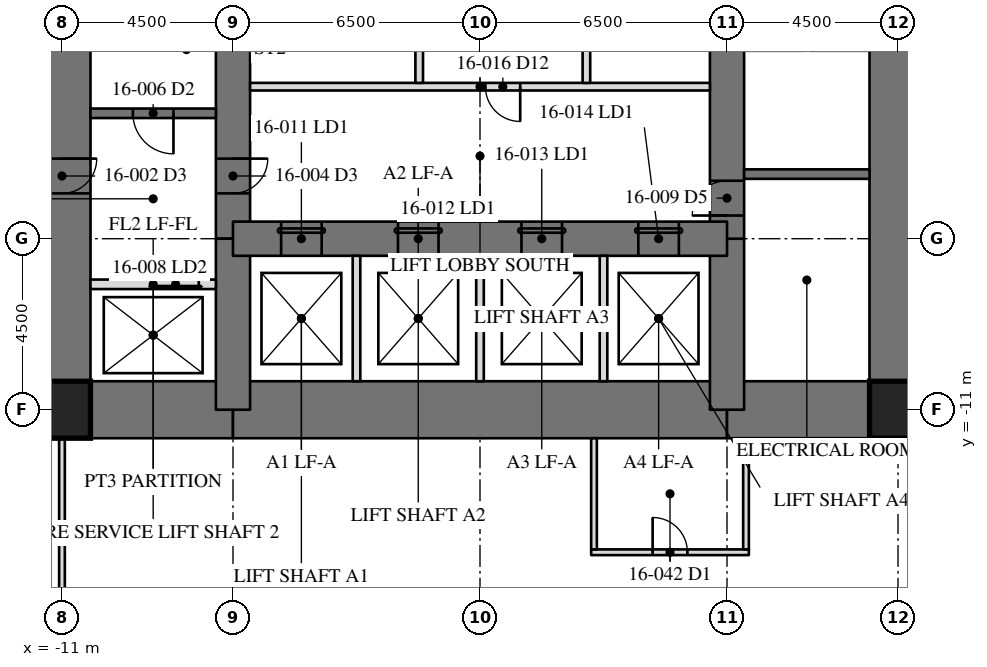
"""IFC4 building model, lengths in metres.
Left out: names, types, materials, properties, quantities, classifications, styles, units other than length and angle.
Written with IfcOpenShell. Run it as: python <this file> out.ifc"""

import sys

from ifc_helpers import new_model, si_unit, direction, frame, frame_2d, origin, origin_2d, place, context, subcontext, project, spatial, rectangle, hollow_rectangle, extrude, element, fill, save


model = new_model("IFC4")
c1 = context("Model", 3, precision=1e-05, world=origin(), true_north=direction((0.0, 1.0)))
c2 = subcontext(c1, "Body", "Model", "MODEL_VIEW")
j1 = project(units=[si_unit("LENGTHUNIT", "METRE"), si_unit("PLANEANGLEUNIT", "RADIAN")], contexts=[c1])
p1 = place(None, origin())
s1 = spatial("IfcSite", under=j1, at=p1, CompositionType="ELEMENT")
p2 = place(p1, origin())
s2 = spatial("IfcBuilding", under=s1, at=p2, CompositionType="ELEMENT")
p3 = place(p2, frame((0.0, 0.0, 69.3)))
s3 = spatial("IfcBuildingStorey", under=s2, at=p3, CompositionType="ELEMENT", Elevation=69.3)
p4 = place(p3, frame((11.0, -11.0, 0.0), z_axis=(0.0, 0.0, 1.0), x_axis=(0.0, 1.0, 0.0)))
e1 = element("IfcWall", 1, at=p4, inside=s3, PredefinedType="SHEAR", context=c2, shape_type="SweptSolid", body=[
    extrude(rectangle(XDim=22.0, YDim=1.5, at=frame_2d((11.0, 0.0))), origin(), (0.0, 0.0, 1.0), 4.1),
])
p5 = place(p4, frame((15.393, 0.0, 0.0)))
e2 = element("IfcOpeningElement", 2, at=p5, cuts=e1, PredefinedType="OPENING", context=c2, shape_type="SweptSolid", body=[
    extrude(rectangle(XDim=0.915, YDim=2.134, at=frame_2d((0.458, 1.067))), frame((0.0, 0.76, 0.0), z_axis=(0.0, -1.0, 0.0), x_axis=(1.0, 0.0, 0.0)), (0.0, 0.0, 1.0), 1.52),
])
p6 = place(p3, frame((-11.0, 11.0, 0.0), z_axis=(0.0, 0.0, 1.0), x_axis=(0.0, -1.0, 0.0)))
e3 = element("IfcWall", 3, at=p6, inside=s3, PredefinedType="SHEAR", context=c2, shape_type="SweptSolid", body=[
    extrude(rectangle(XDim=22.0, YDim=1.5, at=frame_2d((11.0, 0.0))), origin(), (0.0, 0.0, 1.0), 4.1),
])
p7 = place(p6, frame((15.393, 0.0, 0.0)))
e4 = element("IfcOpeningElement", 4, at=p7, cuts=e3, PredefinedType="OPENING", context=c2, shape_type="SweptSolid", body=[
    extrude(rectangle(XDim=0.915, YDim=2.134, at=frame_2d((0.458, 1.067))), frame((0.0, 0.76, 0.0), z_axis=(0.0, -1.0, 0.0), x_axis=(1.0, 0.0, 0.0)), (0.0, 0.0, 1.0), 1.52),
])
p8 = place(p3, frame((-11.0, -11.0, 0.0), z_axis=(0.0, 0.0, 1.0), x_axis=(1.0, 0.0, 0.0)))
e5 = element("IfcWall", 5, at=p8, inside=s3, PredefinedType="SHEAR", context=c2, shape_type="SweptSolid", body=[
    extrude(rectangle(XDim=4.5, YDim=1.5, at=frame_2d((2.25, 0.0))), origin(), (0.0, 0.0, 1.0), 4.1),
])
p9 = place(p3, frame((-6.5, -11.0, 0.0), z_axis=(0.0, 0.0, 1.0), x_axis=(1.0, 0.0, 0.0)))
e6 = element("IfcWall", 6, at=p9, inside=s3, PredefinedType="SHEAR", context=c2, shape_type="SweptSolid", body=[
    extrude(rectangle(XDim=13.0, YDim=1.5, at=frame_2d((6.5, 0.0))), origin(), (0.0, 0.0, 1.0), 4.1),
])
p10 = place(p3, frame((6.5, -11.0, 0.0), z_axis=(0.0, 0.0, 1.0), x_axis=(1.0, 0.0, 0.0)))
e7 = element("IfcWall", 7, at=p10, inside=s3, PredefinedType="SHEAR", context=c2, shape_type="SweptSolid", body=[
    extrude(rectangle(XDim=4.5, YDim=1.5, at=frame_2d((2.25, 0.0))), origin(), (0.0, 0.0, 1.0), 4.1),
])
p11 = place(p3, frame((6.5, -11.0, 0.0), z_axis=(0.0, 0.0, 1.0), x_axis=(0.0, 1.0, 0.0)))
e8 = element("IfcWall", 8, at=p11, inside=s3, PredefinedType="SHEAR", context=c2, shape_type="SweptSolid", body=[
    extrude(rectangle(XDim=4.5, YDim=0.9, at=frame_2d((2.25, 0.0))), origin(), (0.0, 0.0, 1.0), 4.1),
])
p12 = place(p3, frame((6.5, -6.5, 0.0), z_axis=(0.0, 0.0, 1.0), x_axis=(0.0, 1.0, 0.0)))
e9 = element("IfcWall", 9, at=p12, inside=s3, PredefinedType="SHEAR", context=c2, shape_type="SweptSolid", body=[
    extrude(rectangle(XDim=13.0, YDim=0.9, at=frame_2d((6.5, 0.0))), origin(), (0.0, 0.0, 1.0), 4.1),
])
p13 = place(p12, frame((10.893, 0.0, 0.0)))
e10 = element("IfcOpeningElement", 10, at=p13, cuts=e9, PredefinedType="OPENING", context=c2, shape_type="SweptSolid", body=[
    extrude(rectangle(XDim=0.915, YDim=2.134, at=frame_2d((0.458, 1.067))), frame((0.0, 0.46, 0.0), z_axis=(0.0, -1.0, 0.0), x_axis=(1.0, 0.0, 0.0)), (0.0, 0.0, 1.0), 0.92),
])
p14 = place(p12, frame((0.61, 0.0, 0.0)))
e11 = element("IfcOpeningElement", 11, at=p14, cuts=e9, PredefinedType="OPENING", context=c2, shape_type="SweptSolid", body=[
    extrude(rectangle(XDim=0.915, YDim=2.134, at=frame_2d((0.458, 1.067))), frame((0.0, 0.46, 0.0), z_axis=(0.0, -1.0, 0.0), x_axis=(1.0, 0.0, 0.0)), (0.0, 0.0, 1.0), 0.92),
])
p15 = place(p3, frame((-6.5, 6.5, 0.0), z_axis=(0.0, 0.0, 1.0), x_axis=(0.0, -1.0, 0.0)))
e12 = element("IfcWall", 12, at=p15, inside=s3, PredefinedType="SHEAR", context=c2, shape_type="SweptSolid", body=[
    extrude(rectangle(XDim=13.0, YDim=0.9, at=frame_2d((6.5, 0.0))), origin(), (0.0, 0.0, 1.0), 4.1),
])
p16 = place(p15, frame((10.893, 0.0, 0.0)))
e13 = element("IfcOpeningElement", 13, at=p16, cuts=e12, PredefinedType="OPENING", context=c2, shape_type="SweptSolid", body=[
    extrude(rectangle(XDim=0.915, YDim=2.134, at=frame_2d((0.458, 1.067))), frame((0.0, 0.46, 0.0), z_axis=(0.0, -1.0, 0.0), x_axis=(1.0, 0.0, 0.0)), (0.0, 0.0, 1.0), 0.92),
])
p17 = place(p15, frame((0.61, 0.0, 0.0)))
e14 = element("IfcOpeningElement", 14, at=p17, cuts=e12, PredefinedType="OPENING", context=c2, shape_type="SweptSolid", body=[
    extrude(rectangle(XDim=0.915, YDim=2.134, at=frame_2d((0.458, 1.067))), frame((0.0, 0.46, 0.0), z_axis=(0.0, -1.0, 0.0), x_axis=(1.0, 0.0, 0.0)), (0.0, 0.0, 1.0), 0.92),
])
p18 = place(p3, frame((-6.5, -6.5, 0.0), z_axis=(0.0, 0.0, 1.0), x_axis=(0.0, -1.0, 0.0)))
e15 = element("IfcWall", 15, at=p18, inside=s3, PredefinedType="SHEAR", context=c2, shape_type="SweptSolid", body=[
    extrude(rectangle(XDim=4.5, YDim=0.9, at=frame_2d((2.25, 0.0))), origin(), (0.0, 0.0, 1.0), 4.1),
])
p19 = place(p3, frame((-6.5, -6.5, 0.0), z_axis=(0.0, 0.0, 1.0), x_axis=(1.0, 0.0, 0.0)))
e16 = element("IfcWall", 16, at=p19, inside=s3, PredefinedType="SHEAR", context=c2, shape_type="SweptSolid", body=[
    extrude(rectangle(XDim=13.0, YDim=0.9, at=frame_2d((6.5, 0.0))), origin(), (0.0, 0.0, 1.0), 4.1),
])
p20 = place(p19, frame((1.267, 0.0, 0.0)))
e17 = element("IfcOpeningElement", 17, at=p20, cuts=e16, PredefinedType="OPENING", context=c2, shape_type="SweptSolid", body=[
    extrude(rectangle(XDim=1.067, YDim=2.134, at=frame_2d((0.533, 1.067))), frame((0.0, 0.46, 0.0), z_axis=(0.0, -1.0, 0.0), x_axis=(1.0, 0.0, 0.0)), (0.0, 0.0, 1.0), 0.92),
])
p21 = place(p19, frame((4.342, 0.0, 0.0)))
e18 = element("IfcOpeningElement", 18, at=p21, cuts=e16, PredefinedType="OPENING", context=c2, shape_type="SweptSolid", body=[
    extrude(rectangle(XDim=1.067, YDim=2.134, at=frame_2d((0.533, 1.067))), frame((0.0, 0.46, 0.0), z_axis=(0.0, -1.0, 0.0), x_axis=(1.0, 0.0, 0.0)), (0.0, 0.0, 1.0), 0.92),
])
p22 = place(p19, frame((7.592, 0.0, 0.0)))
e19 = element("IfcOpeningElement", 19, at=p22, cuts=e16, PredefinedType="OPENING", context=c2, shape_type="SweptSolid", body=[
    extrude(rectangle(XDim=1.067, YDim=2.134, at=frame_2d((0.533, 1.067))), frame((0.0, 0.46, 0.0), z_axis=(0.0, -1.0, 0.0), x_axis=(1.0, 0.0, 0.0)), (0.0, 0.0, 1.0), 0.92),
])
p23 = place(p19, frame((10.667, 0.0, 0.0)))
e20 = element("IfcOpeningElement", 20, at=p23, cuts=e16, PredefinedType="OPENING", context=c2, shape_type="SweptSolid", body=[
    extrude(rectangle(XDim=1.067, YDim=2.134, at=frame_2d((0.533, 1.067))), frame((0.0, 0.46, 0.0), z_axis=(0.0, -1.0, 0.0), x_axis=(1.0, 0.0, 0.0)), (0.0, 0.0, 1.0), 0.92),
])
for number, where, z_axis, x_axis in (
    (21, (-11.0, -11.0, 0.0), (0.0, 0.0, 1.0), (1.0, 0.0, 0.0)),
    (22, (11.0, -11.0, 0.0), (0.0, 0.0, 1.0), (1.0, 0.0, 0.0)),
):
    element("IfcColumn", number, at=place(p3, frame(where, z_axis=z_axis, x_axis=x_axis)), inside=s3, PredefinedType="COLUMN", context=c2, shape_type="SweptSolid", body=[
        extrude(hollow_rectangle(XDim=1.499, YDim=1.499, WallThickness=0.102, at=origin_2d()), origin(), (0.0, 0.0, 1.0), 4.1),
    ])
p24 = place(p3, frame((6.95, -4.8, 0.0), z_axis=(0.0, 0.0, 1.0), x_axis=(1.0, 0.0, 0.0)))
e23 = element("IfcWall", 23, at=p24, inside=s3, PredefinedType="SOLIDWALL", context=c2, shape_type="SweptSolid", body=[
    extrude(rectangle(XDim=3.3, YDim=0.25, at=frame_2d((1.65, 0.0))), origin(), (0.0, 0.0, 1.0), 3.91),
])
p25 = place(p3, frame((-6.95, -3.2, 0.0), z_axis=(0.0, 0.0, 1.0), x_axis=(-1.0, 0.0, 0.0)))
e24 = element("IfcWall", 24, at=p25, inside=s3, PredefinedType="SOLIDWALL", context=c2, shape_type="SweptSolid", body=[
    extrude(rectangle(XDim=3.3, YDim=0.25, at=frame_2d((1.65, 0.0))), origin(), (0.0, 0.0, 1.0), 3.91),
])
p26 = place(p25, frame((1.116, 0.0, 0.0)))
e25 = element("IfcOpeningElement", 25, at=p26, cuts=e24, PredefinedType="OPENING", context=c2, shape_type="SweptSolid", body=[
    extrude(rectangle(XDim=1.067, YDim=2.134, at=frame_2d((0.533, 1.067))), frame((0.0, 0.135, 0.0), z_axis=(0.0, -1.0, 0.0), x_axis=(1.0, 0.0, 0.0)), (0.0, 0.0, 1.0), 0.27),
])
p27 = place(p3, frame((-6.95, -7.7, 0.0), z_axis=(0.0, 0.0, 1.0), x_axis=(-1.0, 0.0, 0.0)))
e26 = element("IfcWall", 26, at=p27, inside=s3, PredefinedType="PARTITIONING", context=c2, shape_type="SweptSolid", body=[
    extrude(rectangle(XDim=3.3, YDim=0.25, at=frame_2d((1.65, 0.0))), origin(), (0.0, 0.0, 1.0), 3.91),
])
p28 = place(p27, frame((0.45, 0.0, 0.0)))
e27 = element("IfcOpeningElement", 27, at=p28, cuts=e26, PredefinedType="OPENING", context=c2, shape_type="SweptSolid", body=[
    extrude(rectangle(XDim=1.219, YDim=2.134, at=frame_2d((0.609, 1.067))), frame((0.0, 0.135, 0.0), z_axis=(0.0, -1.0, 0.0), x_axis=(1.0, 0.0, 0.0)), (0.0, 0.0, 1.0), 0.27),
])
p29 = place(p3, frame((6.05, -2.5, 0.0), z_axis=(0.0, 0.0, 1.0), x_axis=(-1.0, 0.0, 0.0)))
e28 = element("IfcWall", 28, at=p29, inside=s3, PredefinedType="PARTITIONING", context=c2, shape_type="SweptSolid", body=[
    extrude(rectangle(XDim=12.1, YDim=0.2, at=frame_2d((6.05, 0.0))), origin(), (0.0, 0.0, 1.0), 3.91),
])
p30 = place(p29, frame((4.992, 0.0, 0.0)))
e29 = element("IfcOpeningElement", 29, at=p30, cuts=e28, PredefinedType="OPENING", context=c2, shape_type="SweptSolid", body=[
    extrude(rectangle(XDim=0.915, YDim=2.134, at=frame_2d((0.458, 1.067))), frame((0.0, 0.11, 0.0), z_axis=(0.0, -1.0, 0.0), x_axis=(1.0, 0.0, 0.0)), (0.0, 0.0, 1.0), 0.22),
])
for number, where, z_axis, x_axis in (
    (30, (-3.25, -10.25, 0.0), (0.0, 0.0, 1.0), (0.0, 1.0, 0.0)),
    (31, (0.0, -10.25, 0.0), (0.0, 0.0, 1.0), (0.0, 1.0, 0.0)),
    (32, (3.25, -10.25, 0.0), (0.0, 0.0, 1.0), (0.0, 1.0, 0.0)),
):
    element("IfcWall", number, at=place(p3, frame(where, z_axis=z_axis, x_axis=x_axis)), inside=s3, PredefinedType="PARTITIONING", context=c2, shape_type="SweptSolid", body=[
        extrude(rectangle(XDim=3.3, YDim=0.2, at=frame_2d((1.65, 0.0))), origin(), (0.0, 0.0, 1.0), 3.91),
    ])
for number, where, z_axis, x_axis in (
    (33, (-1.6, -2.4, 0.0), (0.0, 0.0, 1.0), (0.0, 1.0, 0.0)),
    (34, (2.8, -2.4, 0.0), (0.0, 0.0, 1.0), (0.0, 1.0, 0.0)),
):
    element("IfcWall", number, at=place(p3, frame(where, z_axis=z_axis, x_axis=x_axis)), inside=s3, PredefinedType="PARTITIONING", context=c2, shape_type="SweptSolid", body=[
        extrude(rectangle(XDim=4.8, YDim=0.2, at=frame_2d((2.4, 0.0))), origin(), (0.0, 0.0, 1.0), 3.91),
    ])
p31 = place(p3, frame((-11.0, -11.75, 0.0), z_axis=(0.0, 0.0, 1.0), x_axis=(0.0, -1.0, 0.0)))
e35 = element("IfcWall", 35, at=p31, inside=s3, PredefinedType="PARTITIONING", context=c2, shape_type="SweptSolid", body=[
    extrude(rectangle(XDim=13.665, YDim=0.15, at=frame_2d((6.833, 0.0))), origin(), (0.0, 0.0, 1.0), 3.13),
])
p32 = place(p31, frame((6.018, 0.0, 0.0)))
e36 = element("IfcOpeningElement", 36, at=p32, cuts=e35, PredefinedType="OPENING", context=c2, shape_type="SweptSolid", body=[
    extrude(rectangle(XDim=0.915, YDim=2.134, at=frame_2d((0.458, 1.067))), frame((0.0, 0.085, 0.0), z_axis=(0.0, -1.0, 0.0), x_axis=(1.0, 0.0, 0.0)), (0.0, 0.0, 1.0), 0.17),
])
p33 = place(p3, frame((2.925, -14.75, 0.0), z_axis=(0.0, 0.0, 1.0), x_axis=(1.0, 0.0, 0.0)))
e37 = element("IfcWall", 37, at=p33, inside=s3, PredefinedType="PARTITIONING", context=c2, shape_type="SweptSolid", body=[
    extrude(rectangle(XDim=4.15, YDim=0.15, at=frame_2d((2.075, 0.0))), origin(), (0.0, 0.0, 1.0), 3.91),
])
p34 = place(p33, frame((1.617, 0.0, 0.0)))
e38 = element("IfcOpeningElement", 38, at=p34, cuts=e37, PredefinedType="OPENING", context=c2, shape_type="SweptSolid", body=[
    extrude(rectangle(XDim=0.915, YDim=2.134, at=frame_2d((0.458, 1.067))), frame((0.0, 0.085, 0.0), z_axis=(0.0, -1.0, 0.0), x_axis=(1.0, 0.0, 0.0)), (0.0, 0.0, 1.0), 0.17),
])
for number, where, z_axis, x_axis in (
    (39, (3.0, -14.675, 0.0), (0.0, 0.0, 1.0), (0.0, 1.0, 0.0)),
    (40, (7.0, -14.675, 0.0), (0.0, 0.0, 1.0), (0.0, 1.0, 0.0)),
):
    element("IfcWall", number, at=place(p3, frame(where, z_axis=z_axis, x_axis=x_axis)), inside=s3, PredefinedType="PARTITIONING", context=c2, shape_type="SweptSolid", body=[
        extrude(rectangle(XDim=2.925, YDim=0.15, at=frame_2d((1.462, 0.0))), origin(), (0.0, 0.0, 1.0), 3.91),
    ])
p35 = place(p16, origin())
e41 = element("IfcDoor", 41, at=p35, inside=s3, OperationType="SINGLE_SWING_RIGHT", PredefinedType="DOOR", context=c2, shape_type="SweptSolid", body=[
    extrude(rectangle(XDim=0.915, YDim=2.134, at=frame_2d((0.458, 1.067))), frame((0.0, -0.375, 0.0), z_axis=(0.0, -1.0, 0.0), x_axis=(1.0, 0.0, 0.0)), (0.0, 0.0, 1.0), 0.05),
])
fill(e13, e41)
p36 = place(p26, origin())
e42 = element("IfcDoor", 42, at=p36, inside=s3, OperationType="SINGLE_SWING_LEFT", PredefinedType="DOOR", context=c2, shape_type="SweptSolid", body=[
    extrude(rectangle(XDim=1.067, YDim=2.134, at=frame_2d((0.533, 1.067))), frame((0.0, 0.025, 0.0), z_axis=(0.0, -1.0, 0.0), x_axis=(1.0, 0.0, 0.0)), (0.0, 0.0, 1.0), 0.05),
])
fill(e25, e42)
p37 = place(p28, origin())
e43 = element("IfcDoor", 43, at=p37, inside=s3, OperationType="SLIDING_TO_LEFT", PredefinedType="DOOR", context=c2, shape_type="SweptSolid", body=[
    extrude(rectangle(XDim=1.219, YDim=2.134, at=frame_2d((0.609, 1.067))), frame((0.0, 0.025, 0.0), z_axis=(0.0, -1.0, 0.0), x_axis=(1.0, 0.0, 0.0)), (0.0, 0.0, 1.0), 0.05),
])
fill(e27, e43)
p38 = place(p14, origin())
e44 = element("IfcDoor", 44, at=p38, inside=s3, OperationType="SINGLE_SWING_RIGHT", PredefinedType="DOOR", context=c2, shape_type="SweptSolid", body=[
    extrude(rectangle(XDim=0.915, YDim=2.134, at=frame_2d((0.458, 1.067))), frame((0.0, -0.375, 0.0), z_axis=(0.0, -1.0, 0.0), x_axis=(1.0, 0.0, 0.0)), (0.0, 0.0, 1.0), 0.05),
])
fill(e11, e44)
p39 = place(p20, origin())
e45 = element("IfcDoor", 45, at=p39, inside=s3, OperationType="SLIDING_TO_LEFT", PredefinedType="DOOR", context=c2, shape_type="SweptSolid", body=[
    extrude(rectangle(XDim=1.067, YDim=2.134, at=frame_2d((0.533, 1.067))), frame((0.0, -0.375, 0.0), z_axis=(0.0, -1.0, 0.0), x_axis=(1.0, 0.0, 0.0)), (0.0, 0.0, 1.0), 0.05),
])
fill(e17, e45)
p40 = place(p21, origin())
e46 = element("IfcDoor", 46, at=p40, inside=s3, OperationType="SLIDING_TO_LEFT", PredefinedType="DOOR", context=c2, shape_type="SweptSolid", body=[
    extrude(rectangle(XDim=1.067, YDim=2.134, at=frame_2d((0.533, 1.067))), frame((0.0, -0.375, 0.0), z_axis=(0.0, -1.0, 0.0), x_axis=(1.0, 0.0, 0.0)), (0.0, 0.0, 1.0), 0.05),
])
fill(e18, e46)
p41 = place(p22, origin())
e47 = element("IfcDoor", 47, at=p41, inside=s3, OperationType="SLIDING_TO_LEFT", PredefinedType="DOOR", context=c2, shape_type="SweptSolid", body=[
    extrude(rectangle(XDim=1.067, YDim=2.134, at=frame_2d((0.533, 1.067))), frame((0.0, -0.375, 0.0), z_axis=(0.0, -1.0, 0.0), x_axis=(1.0, 0.0, 0.0)), (0.0, 0.0, 1.0), 0.05),
])
fill(e19, e47)
p42 = place(p23, origin())
e48 = element("IfcDoor", 48, at=p42, inside=s3, OperationType="SLIDING_TO_LEFT", PredefinedType="DOOR", context=c2, shape_type="SweptSolid", body=[
    extrude(rectangle(XDim=1.067, YDim=2.134, at=frame_2d((0.533, 1.067))), frame((0.0, -0.375, 0.0), z_axis=(0.0, -1.0, 0.0), x_axis=(1.0, 0.0, 0.0)), (0.0, 0.0, 1.0), 0.05),
])
fill(e20, e48)
p43 = place(p30, origin())
e49 = element("IfcDoor", 49, at=p43, inside=s3, OperationType="SINGLE_SWING_LEFT", PredefinedType="DOOR", context=c2, shape_type="SweptSolid", body=[
    extrude(rectangle(XDim=0.915, YDim=2.134, at=frame_2d((0.458, 1.067))), frame((0.0, 0.025, 0.0), z_axis=(0.0, -1.0, 0.0), x_axis=(1.0, 0.0, 0.0)), (0.0, 0.0, 1.0), 0.05),
])
fill(e29, e49)
p44 = place(p34, origin())
e50 = element("IfcDoor", 50, at=p44, inside=s3, OperationType="SINGLE_SWING_LEFT", PredefinedType="DOOR", context=c2, shape_type="SweptSolid", body=[
    extrude(rectangle(XDim=0.915, YDim=2.134, at=frame_2d((0.458, 1.067))), frame((0.0, 0.025, 0.0), z_axis=(0.0, -1.0, 0.0), x_axis=(1.0, 0.0, 0.0)), (0.0, 0.0, 1.0), 0.05),
])
fill(e38, e50)
save(model, sys.argv[1])
